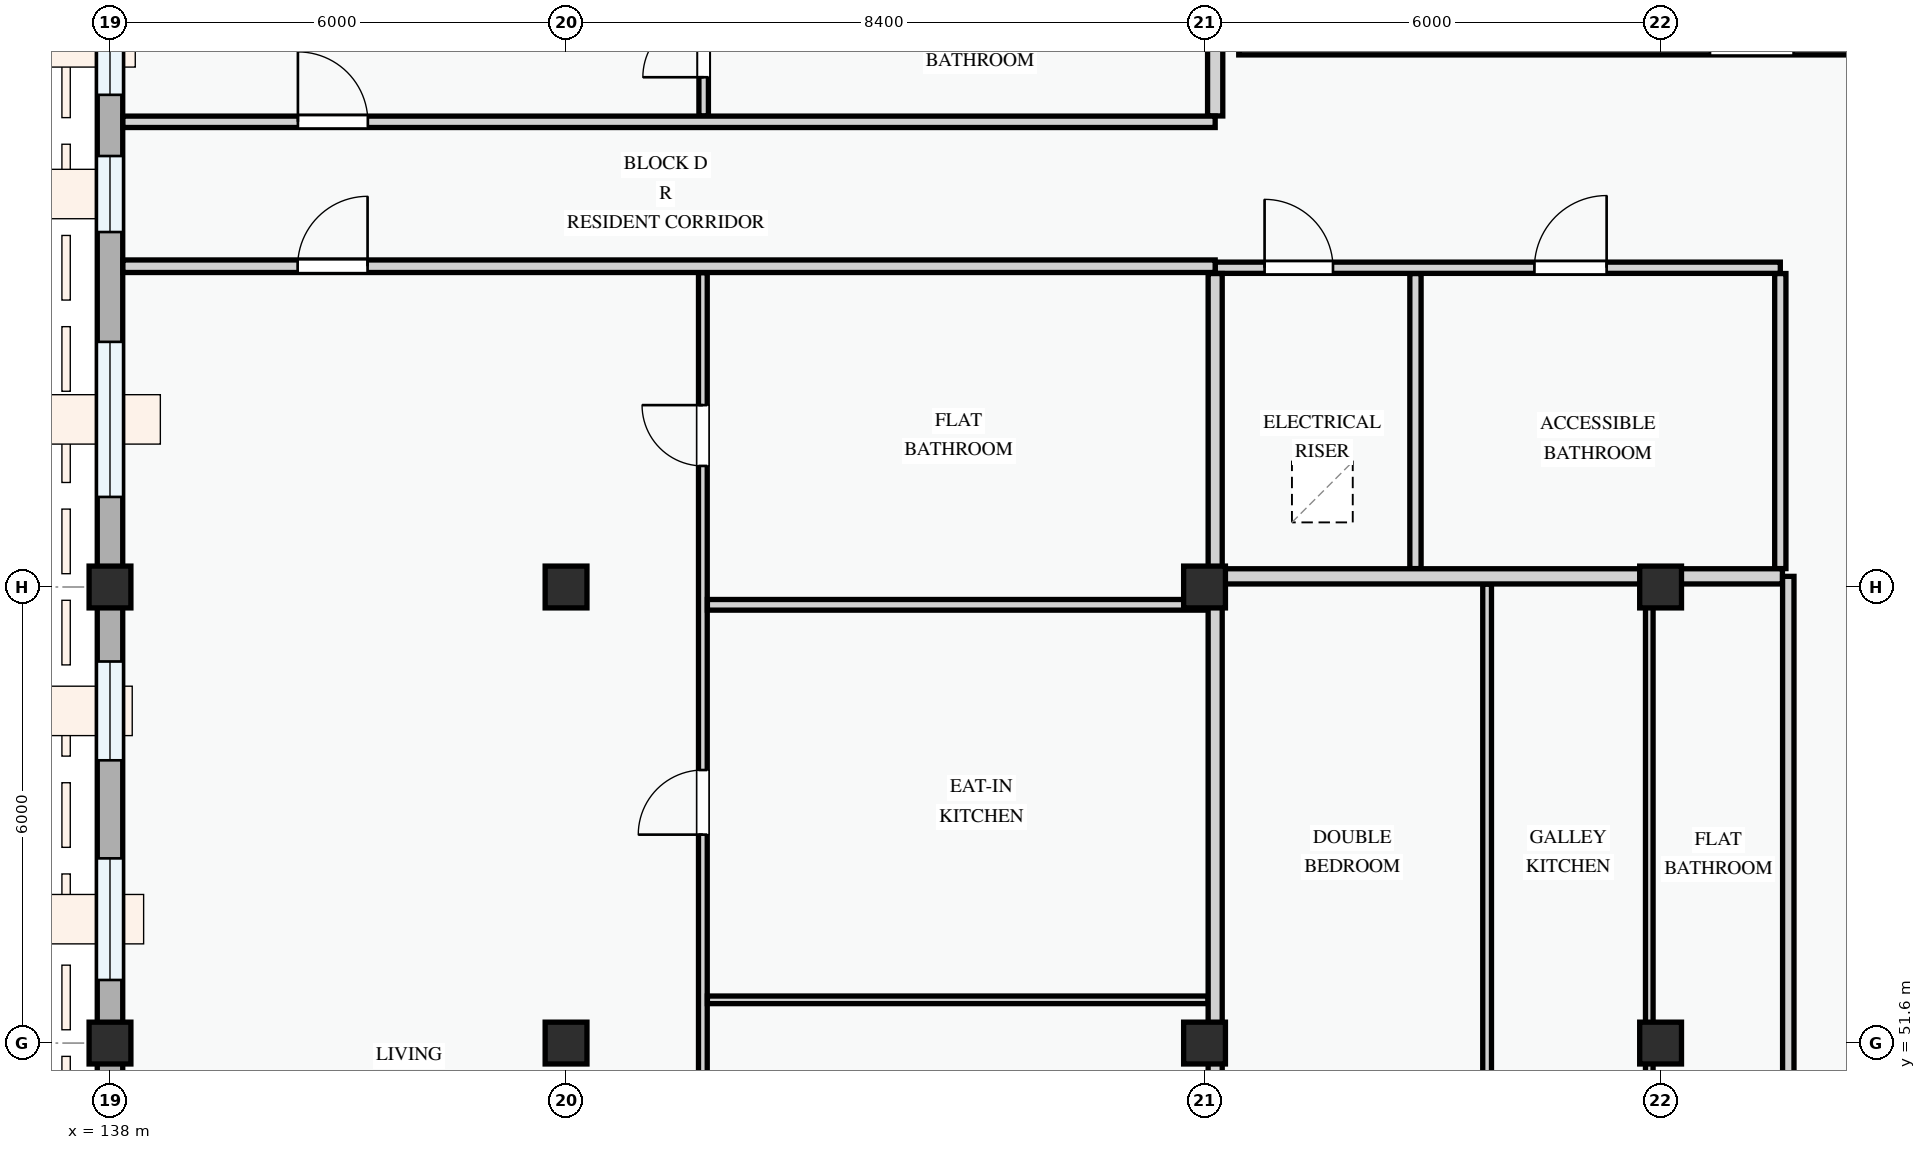
"""IFC4 building model, lengths in metres.
Left out: names, types, materials, properties, quantities, classifications, styles, units other than length and angle.
Written with IfcOpenShell. Run it as: python <this file> out.ifc"""

import sys

from ifc_helpers import new_model, si_unit, direction, frame, frame_2d, origin, origin_2d, place, context, subcontext, project, spatial, rectangle, extrude, element, fill, save


model = new_model("IFC4")
c1 = context("Model", 3, precision=1e-05, world=origin(), true_north=direction((0.0, 1.0)))
c2 = subcontext(c1, "Body", "Model", "MODEL_VIEW")
j1 = project(units=[si_unit("LENGTHUNIT", "METRE"), si_unit("PLANEANGLEUNIT", "RADIAN")], contexts=[c1])
p1 = place(None, origin())
s1 = spatial("IfcSite", under=j1, at=p1, CompositionType="ELEMENT")
p2 = place(p1, origin())
s2 = spatial("IfcBuilding", under=s1, at=p2, CompositionType="ELEMENT")
p3 = place(p2, frame((0.0, 0.0, 8.1)))
s3 = spatial("IfcBuildingStorey", under=s2, at=p3, CompositionType="ELEMENT", Elevation=8.1)
for number, where, z_axis, x_axis in (
    (1, (138.0, 51.6, 0.0), (0.0, 0.0, 1.0), (1.0, 0.0, 0.0)),
    (2, (138.0, 57.6, 0.0), (0.0, 0.0, 1.0), (1.0, 0.0, 0.0)),
    (3, (144.0, 51.6, 0.0), (0.0, 0.0, 1.0), (1.0, 0.0, 0.0)),
    (4, (144.0, 57.6, 0.0), (0.0, 0.0, 1.0), (1.0, 0.0, 0.0)),
    (5, (152.4, 51.6, 0.0), (0.0, 0.0, 1.0), (1.0, 0.0, 0.0)),
    (6, (152.4, 57.6, 0.0), (0.0, 0.0, 1.0), (1.0, 0.0, 0.0)),
    (7, (158.4, 51.6, 0.0), (0.0, 0.0, 1.0), (1.0, 0.0, 0.0)),
    (8, (158.4, 57.6, 0.0), (0.0, 0.0, 1.0), (1.0, 0.0, 0.0)),
):
    element("IfcColumn", number, at=place(p3, frame(where, z_axis=z_axis, x_axis=x_axis)), inside=s3, PredefinedType="COLUMN", context=c2, shape_type="SweptSolid", body=[
        extrude(rectangle(XDim=0.55, YDim=0.55, at=origin_2d()), origin(), (0.0, 0.0, 1.0), 3.3),
    ])
p4 = place(p3, frame((138.0, 66.0, 0.0), z_axis=(0.0, 0.0, 1.0), x_axis=(0.0, -1.0, 0.0)))
e9 = element("IfcWall", 9, at=p4, inside=s3, PredefinedType="STANDARD", context=c2, shape_type="SweptSolid", body=[
    extrude(rectangle(XDim=8.4, YDim=0.335, at=frame_2d((4.2, 0.0))), origin(), (0.0, 0.0, 1.0), 2.425),
])
p5 = place(p4, frame((0.545, 0.0, 0.78)))
e10 = element("IfcOpeningElement", 10, at=p5, cuts=e9, PredefinedType="OPENING", context=c2, shape_type="SweptSolid", body=[
    extrude(rectangle(XDim=1.38, YDim=1.48, at=frame_2d((0.69, 0.74))), frame((0.0, 0.177, 0.0), z_axis=(0.0, -1.0, 0.0), x_axis=(1.0, 0.0, 0.0)), (0.0, 0.0, 1.0), 0.355),
])
p6 = place(p4, frame((2.73, 0.0, 0.78)))
e11 = element("IfcOpeningElement", 11, at=p6, cuts=e9, PredefinedType="OPENING", context=c2, shape_type="SweptSolid", body=[
    extrude(rectangle(XDim=1.0, YDim=1.25, at=frame_2d((0.5, 0.625))), frame((0.0, 0.177, 0.0), z_axis=(0.0, -1.0, 0.0), x_axis=(1.0, 0.0, 0.0)), (0.0, 0.0, 1.0), 0.355),
])
p7 = place(p4, frame((5.175, 0.0, 0.78)))
e12 = element("IfcOpeningElement", 12, at=p7, cuts=e9, PredefinedType="OPENING", context=c2, shape_type="SweptSolid", body=[
    extrude(rectangle(XDim=2.04, YDim=1.46, at=frame_2d((1.02, 0.73))), frame((0.0, 0.177, 0.0), z_axis=(0.0, -1.0, 0.0), x_axis=(1.0, 0.0, 0.0)), (0.0, 0.0, 1.0), 0.355),
])
p8 = place(p3, frame((138.0, 57.6, 0.0), z_axis=(0.0, 0.0, 1.0), x_axis=(0.0, -1.0, 0.0)))
e13 = element("IfcWall", 13, at=p8, inside=s3, PredefinedType="STANDARD", context=c2, shape_type="SweptSolid", body=[
    extrude(rectangle(XDim=6.0, YDim=0.335, at=frame_2d((3.0, 0.0))), origin(), (0.0, 0.0, 1.0), 2.575),
])
p9 = place(p8, frame((0.98, 0.0, 0.78)))
e14 = element("IfcOpeningElement", 14, at=p9, cuts=e13, PredefinedType="OPENING", context=c2, shape_type="SweptSolid", body=[
    extrude(rectangle(XDim=1.3, YDim=1.4, at=frame_2d((0.65, 0.7))), frame((0.0, 0.177, 0.0), z_axis=(0.0, -1.0, 0.0), x_axis=(1.0, 0.0, 0.0)), (0.0, 0.0, 1.0), 0.355),
])
p10 = place(p8, frame((3.57, 0.0, 0.78)))
e15 = element("IfcOpeningElement", 15, at=p10, cuts=e13, PredefinedType="OPENING", context=c2, shape_type="SweptSolid", body=[
    extrude(rectangle(XDim=1.6, YDim=1.55, at=frame_2d((0.8, 0.775))), frame((0.0, 0.177, 0.0), z_axis=(0.0, -1.0, 0.0), x_axis=(1.0, 0.0, 0.0)), (0.0, 0.0, 1.0), 0.355),
])
p11 = place(p3, frame((138.0, 51.6, 0.0), z_axis=(0.0, 0.0, 1.0), x_axis=(0.0, -1.0, 0.0)))
e16 = element("IfcWall", 16, at=p11, inside=s3, PredefinedType="STANDARD", context=c2, shape_type="SweptSolid", body=[
    extrude(rectangle(XDim=8.4, YDim=0.335, at=frame_2d((4.2, 0.0))), origin(), (0.0, 0.0, 1.0), 2.425),
])
p12 = place(p11, frame((1.42, 0.0, 0.78)))
e17 = element("IfcOpeningElement", 17, at=p12, cuts=e16, PredefinedType="OPENING", context=c2, shape_type="SweptSolid", body=[
    extrude(rectangle(XDim=1.62, YDim=1.38, at=frame_2d((0.81, 0.69))), frame((0.0, 0.177, 0.0), z_axis=(0.0, -1.0, 0.0), x_axis=(1.0, 0.0, 0.0)), (0.0, 0.0, 1.0), 0.355),
])
p13 = place(p11, frame((5.18, 0.0, 0.78)))
e18 = element("IfcOpeningElement", 18, at=p13, cuts=e16, PredefinedType="OPENING", context=c2, shape_type="SweptSolid", body=[
    extrude(rectangle(XDim=1.98, YDim=1.5, at=frame_2d((0.99, 0.75))), frame((0.0, 0.177, 0.0), z_axis=(0.0, -1.0, 0.0), x_axis=(1.0, 0.0, 0.0)), (0.0, 0.0, 1.0), 0.355),
])
p14 = place(p3, frame((152.85, 64.725, 0.0), z_axis=(0.0, 0.0, 1.0), x_axis=(1.0, 0.0, 0.0)))
e19 = element("IfcWall", 19, at=p14, inside=s3, PredefinedType="SHEAR", context=c2, shape_type="SweptSolid", body=[
    extrude(rectangle(XDim=13.5, YDim=0.25, at=frame_2d((6.75, 0.0))), origin(), (0.0, 0.0, 1.0), 3.0),
])
p15 = place(p14, frame((6.2, 0.0, 0.0)))
e20 = element("IfcOpeningElement", 20, at=p15, cuts=e19, PredefinedType="OPENING", context=c2, shape_type="SweptSolid", body=[
    extrude(rectangle(XDim=1.1, YDim=2.15, at=frame_2d((0.55, 1.075))), frame((0.0, 0.135, 0.0), z_axis=(0.0, -1.0, 0.0), x_axis=(1.0, 0.0, 0.0)), (0.0, 0.0, 1.0), 0.27),
])
for number, where, z_axis, x_axis in (
    (21, (155.175, 61.724, 0.0), (0.0, 0.0, 1.0), (0.0, -1.0, 0.0)),
    (22, (159.975, 61.724, 0.0), (0.0, 0.0, 1.0), (0.0, -1.0, 0.0)),
):
    element("IfcWall", number, at=place(p3, frame(where, z_axis=z_axis, x_axis=x_axis)), inside=s3, PredefinedType="PARTITIONING", context=c2, shape_type="SweptSolid", body=[
        extrude(rectangle(XDim=3.882, YDim=0.148, at=frame_2d((1.941, 0.0))), origin(), (0.0, 0.0, 1.0), 3.0),
    ])
p16 = place(p3, frame((152.54, 61.8, 0.0), z_axis=(0.0, 0.0, 1.0), x_axis=(1.0, 0.0, 0.0)))
e23 = element("IfcWall", 23, at=p16, inside=s3, PredefinedType="PARTITIONING", context=c2, shape_type="SweptSolid", body=[
    extrude(rectangle(XDim=7.435, YDim=0.148, at=frame_2d((3.718, 0.0))), origin(), (0.0, 0.0, 1.0), 3.0),
])
p17 = place(p16, frame((0.65, 0.0, 0.0)))
e24 = element("IfcOpeningElement", 24, at=p17, cuts=e23, PredefinedType="OPENING", context=c2, shape_type="SweptSolid", body=[
    extrude(rectangle(XDim=0.9, YDim=2.1, at=frame_2d((0.45, 1.05))), frame((0.0, 0.084, 0.0), z_axis=(0.0, -1.0, 0.0), x_axis=(1.0, 0.0, 0.0)), (0.0, 0.0, 1.0), 0.168),
])
p18 = place(p16, frame((4.2, 0.0, 0.0)))
e25 = element("IfcOpeningElement", 25, at=p18, cuts=e23, PredefinedType="OPENING", context=c2, shape_type="SweptSolid", body=[
    extrude(rectangle(XDim=0.95, YDim=2.1, at=frame_2d((0.475, 1.05))), frame((0.0, 0.084, 0.0), z_axis=(0.0, -1.0, 0.0), x_axis=(1.0, 0.0, 0.0)), (0.0, 0.0, 1.0), 0.168),
])
p19 = place(p3, frame((156.118, 49.945, 0.0), z_axis=(0.0, 0.0, 1.0), x_axis=(0.0, 1.0, 0.0)))
e26 = element("IfcWall", 26, at=p19, inside=s3, PredefinedType="PARTITIONING", context=c2, shape_type="SweptSolid", body=[
    extrude(rectangle(XDim=7.693, YDim=0.115, at=frame_2d((3.847, 0.0))), origin(), (0.0, 0.0, 1.0), 3.0),
])
p20 = place(p3, frame((158.251, 49.945, 0.0), z_axis=(0.0, 0.0, 1.0), x_axis=(0.0, 1.0, 0.0)))
e27 = element("IfcWall", 27, at=p20, inside=s3, PredefinedType="PARTITIONING", context=c2, shape_type="SweptSolid", body=[
    extrude(rectangle(XDim=7.693, YDim=0.1, at=frame_2d((3.847, 0.0))), origin(), (0.0, 0.0, 1.0), 2.425),
])
p21 = place(p3, frame((152.635, 57.74, 0.0), z_axis=(0.0, 0.0, 1.0), x_axis=(1.0, 0.0, 0.0)))
e28 = element("IfcWall", 28, at=p21, inside=s3, PredefinedType="PARTITIONING", context=c2, shape_type="SweptSolid", body=[
    extrude(rectangle(XDim=7.368, YDim=0.2, at=frame_2d((3.684, 0.0))), origin(), (0.0, 0.0, 1.0), 2.375),
])
p22 = place(p3, frame((160.08, 37.369, 0.0), z_axis=(0.0, 0.0, 1.0), x_axis=(0.0, 1.0, 0.0)))
e29 = element("IfcWall", 29, at=p22, inside=s3, PredefinedType="PARTITIONING", context=c2, shape_type="SweptSolid", body=[
    extrude(rectangle(XDim=20.371, YDim=0.15, at=frame_2d((10.185, 0.0))), origin(), (0.0, 0.0, 1.0), 3.0),
])
p23 = place(p22, frame((2.333, 0.0, 0.0)))
e30 = element("IfcOpeningElement", 30, at=p23, cuts=e29, PredefinedType="OPENING", context=c2, shape_type="SweptSolid", body=[
    extrude(rectangle(XDim=0.92, YDim=2.1, at=frame_2d((0.46, 1.05))), frame((0.0, 0.085, 0.0), z_axis=(0.0, -1.0, 0.0), x_axis=(1.0, 0.0, 0.0)), (0.0, 0.0, 1.0), 0.17),
])
p24 = place(p22, frame((9.601, 0.0, 0.0)))
e31 = element("IfcOpeningElement", 31, at=p24, cuts=e29, PredefinedType="OPENING", context=c2, shape_type="SweptSolid", body=[
    extrude(rectangle(XDim=0.92, YDim=2.1, at=frame_2d((0.46, 1.05))), frame((0.0, 0.085, 0.0), z_axis=(0.0, -1.0, 0.0), x_axis=(1.0, 0.0, 0.0)), (0.0, 0.0, 1.0), 0.17),
])
p25 = place(p3, frame((145.8, 43.369, 0.0), z_axis=(0.0, 0.0, 1.0), x_axis=(0.0, 1.0, 0.0)))
e32 = element("IfcWall", 32, at=p25, inside=s3, PredefinedType="PARTITIONING", context=c2, shape_type="SweptSolid", body=[
    extrude(rectangle(XDim=18.366, YDim=0.115, at=frame_2d((9.183, 0.0))), origin(), (0.0, 0.0, 1.0), 3.0),
])
p26 = place(p25, frame((3.92, 0.0, 0.0)))
e33 = element("IfcOpeningElement", 33, at=p26, cuts=e32, PredefinedType="OPENING", context=c2, shape_type="SweptSolid", body=[
    extrude(rectangle(XDim=0.85, YDim=2.1, at=frame_2d((0.425, 1.05))), frame((0.0, 0.067, 0.0), z_axis=(0.0, -1.0, 0.0), x_axis=(1.0, 0.0, 0.0)), (0.0, 0.0, 1.0), 0.135),
])
p27 = place(p25, frame((10.973, 0.0, 0.0)))
e34 = element("IfcOpeningElement", 34, at=p27, cuts=e32, PredefinedType="OPENING", context=c2, shape_type="SweptSolid", body=[
    extrude(rectangle(XDim=0.85, YDim=2.1, at=frame_2d((0.425, 1.05))), frame((0.0, 0.067, 0.0), z_axis=(0.0, -1.0, 0.0), x_axis=(1.0, 0.0, 0.0)), (0.0, 0.0, 1.0), 0.135),
])
p28 = place(p25, frame((15.823, 0.0, 0.0)))
e35 = element("IfcOpeningElement", 35, at=p28, cuts=e32, PredefinedType="OPENING", context=c2, shape_type="SweptSolid", body=[
    extrude(rectangle(XDim=0.8, YDim=2.1, at=frame_2d((0.4, 1.05))), frame((0.0, 0.067, 0.0), z_axis=(0.0, -1.0, 0.0), x_axis=(1.0, 0.0, 0.0)), (0.0, 0.0, 1.0), 0.135),
])
p29 = place(p3, frame((145.86, 52.169, 0.0), z_axis=(0.0, 0.0, 1.0), x_axis=(1.0, 0.0, 0.0)))
e36 = element("IfcWall", 36, at=p29, inside=s3, PredefinedType="PARTITIONING", context=c2, shape_type="SweptSolid", body=[
    extrude(rectangle(XDim=6.586, YDim=0.1, at=frame_2d((3.293, 0.0))), origin(), (0.0, 0.0, 1.0), 3.0),
])
p30 = place(p3, frame((145.86, 57.365, 0.0), z_axis=(0.0, 0.0, 1.0), x_axis=(1.0, 0.0, 0.0)))
e37 = element("IfcWall", 37, at=p30, inside=s3, PredefinedType="PARTITIONING", context=c2, shape_type="SweptSolid", body=[
    extrude(rectangle(XDim=6.586, YDim=0.14, at=frame_2d((3.293, 0.0))), origin(), (0.0, 0.0, 1.0), 2.375),
])
p31 = place(p3, frame((145.81, 63.797, 0.0), z_axis=(0.0, 0.0, 1.0), x_axis=(0.0, 1.0, 0.0)))
e38 = element("IfcWall", 38, at=p31, inside=s3, PredefinedType="PARTITIONING", context=c2, shape_type="SweptSolid", body=[
    extrude(rectangle(XDim=8.033, YDim=0.125, at=frame_2d((4.017, 0.0))), origin(), (0.0, 0.0, 1.0), 3.0),
])
p32 = place(p31, frame((0.51, 0.0, 0.0)))
e39 = element("IfcOpeningElement", 39, at=p32, cuts=e38, PredefinedType="OPENING", context=c2, shape_type="SweptSolid", body=[
    extrude(rectangle(XDim=0.8, YDim=2.1, at=frame_2d((0.4, 1.05))), frame((0.0, 0.073, 0.0), z_axis=(0.0, -1.0, 0.0), x_axis=(1.0, 0.0, 0.0)), (0.0, 0.0, 1.0), 0.145),
])
p33 = place(p31, frame((2.622, 0.0, 0.0)))
e40 = element("IfcOpeningElement", 40, at=p33, cuts=e38, PredefinedType="OPENING", context=c2, shape_type="SweptSolid", body=[
    extrude(rectangle(XDim=0.85, YDim=2.1, at=frame_2d((0.425, 1.05))), frame((0.0, 0.073, 0.0), z_axis=(0.0, -1.0, 0.0), x_axis=(1.0, 0.0, 0.0)), (0.0, 0.0, 1.0), 0.145),
])
p34 = place(p31, frame((5.745, 0.0, 0.0)))
e41 = element("IfcOpeningElement", 41, at=p34, cuts=e38, PredefinedType="OPENING", context=c2, shape_type="SweptSolid", body=[
    extrude(rectangle(XDim=0.85, YDim=2.1, at=frame_2d((0.425, 1.05))), frame((0.0, 0.073, 0.0), z_axis=(0.0, -1.0, 0.0), x_axis=(1.0, 0.0, 0.0)), (0.0, 0.0, 1.0), 0.145),
])
p35 = place(p3, frame((152.54, 43.26, 0.0), z_axis=(0.0, 0.0, 1.0), x_axis=(0.0, 1.0, 0.0)))
e42 = element("IfcWall", 42, at=p35, inside=s3, PredefinedType="PARTITIONING", context=c2, shape_type="SweptSolid", body=[
    extrude(rectangle(XDim=18.464, YDim=0.185, at=frame_2d((9.232, 0.0))), origin(), (0.0, 0.0, 1.0), 2.425),
])
p36 = place(p3, frame((152.54, 63.797, 0.0), z_axis=(0.0, 0.0, 1.0), x_axis=(0.0, 1.0, 0.0)))
e43 = element("IfcWall", 43, at=p36, inside=s3, PredefinedType="PARTITIONING", context=c2, shape_type="SweptSolid", body=[
    extrude(rectangle(XDim=8.033, YDim=0.2, at=frame_2d((4.017, 0.0))), origin(), (0.0, 0.0, 1.0), 2.425),
])
p37 = place(p3, frame((138.169, 61.82, 0.0), z_axis=(0.0, 0.0, 1.0), x_axis=(1.0, 0.0, 0.0)))
e44 = element("IfcWall", 44, at=p37, inside=s3, PredefinedType="PARTITIONING", context=c2, shape_type="SweptSolid", body=[
    extrude(rectangle(XDim=14.371, YDim=0.165, at=frame_2d((7.185, 0.0))), origin(), (0.0, 0.0, 1.0), 3.0),
])
p38 = place(p37, frame((2.299, 0.0, 0.0)))
e45 = element("IfcOpeningElement", 45, at=p38, cuts=e44, PredefinedType="OPENING", context=c2, shape_type="SweptSolid", body=[
    extrude(rectangle(XDim=0.92, YDim=2.1, at=frame_2d((0.46, 1.05))), frame((0.0, 0.093, 0.0), z_axis=(0.0, -1.0, 0.0), x_axis=(1.0, 0.0, 0.0)), (0.0, 0.0, 1.0), 0.185),
])
p39 = place(p3, frame((138.169, 63.72, 0.0), z_axis=(0.0, 0.0, 1.0), x_axis=(1.0, 0.0, 0.0)))
e46 = element("IfcWall", 46, at=p39, inside=s3, PredefinedType="PARTITIONING", context=c2, shape_type="SweptSolid", body=[
    extrude(rectangle(XDim=14.371, YDim=0.15, at=frame_2d((7.185, 0.0))), origin(), (0.0, 0.0, 1.0), 3.0),
])
p40 = place(p39, frame((2.303, 0.0, 0.0)))
e47 = element("IfcOpeningElement", 47, at=p40, cuts=e46, PredefinedType="OPENING", context=c2, shape_type="SweptSolid", body=[
    extrude(rectangle(XDim=0.92, YDim=2.1, at=frame_2d((0.46, 1.05))), frame((0.0, 0.085, 0.0), z_axis=(0.0, -1.0, 0.0), x_axis=(1.0, 0.0, 0.0)), (0.0, 0.0, 1.0), 0.17),
])
p41 = place(p5, origin())
e48 = element("IfcWindow", 48, at=p41, inside=s3, PartitioningType="SINGLE_PANEL", PredefinedType="WINDOW", context=c2, shape_type="SweptSolid", body=[
    extrude(rectangle(XDim=1.38, YDim=1.48, at=frame_2d((0.69, 0.74))), frame((0.0, 0.03, 0.0), z_axis=(0.0, -1.0, 0.0), x_axis=(1.0, 0.0, 0.0)), (0.0, 0.0, 1.0), 0.06),
])
fill(e10, e48)
p42 = place(p6, origin())
e49 = element("IfcWindow", 49, at=p42, inside=s3, PartitioningType="SINGLE_PANEL", PredefinedType="WINDOW", context=c2, shape_type="SweptSolid", body=[
    extrude(rectangle(XDim=1.0, YDim=1.25, at=frame_2d((0.5, 0.625))), frame((0.0, 0.03, 0.0), z_axis=(0.0, -1.0, 0.0), x_axis=(1.0, 0.0, 0.0)), (0.0, 0.0, 1.0), 0.06),
])
fill(e11, e49)
p43 = place(p7, origin())
e50 = element("IfcWindow", 50, at=p43, inside=s3, PartitioningType="DOUBLE_PANEL_VERTICAL", PredefinedType="WINDOW", context=c2, shape_type="SweptSolid", body=[
    extrude(rectangle(XDim=2.04, YDim=1.46, at=frame_2d((1.02, 0.73))), frame((0.0, 0.03, 0.0), z_axis=(0.0, -1.0, 0.0), x_axis=(1.0, 0.0, 0.0)), (0.0, 0.0, 1.0), 0.06),
])
fill(e12, e50)
p44 = place(p9, origin())
e51 = element("IfcWindow", 51, at=p44, inside=s3, PartitioningType="SINGLE_PANEL", PredefinedType="WINDOW", context=c2, shape_type="SweptSolid", body=[
    extrude(rectangle(XDim=1.3, YDim=1.4, at=frame_2d((0.65, 0.7))), frame((0.0, 0.03, 0.0), z_axis=(0.0, -1.0, 0.0), x_axis=(1.0, 0.0, 0.0)), (0.0, 0.0, 1.0), 0.06),
])
fill(e14, e51)
p45 = place(p10, origin())
e52 = element("IfcWindow", 52, at=p45, inside=s3, PartitioningType="DOUBLE_PANEL_VERTICAL", PredefinedType="WINDOW", context=c2, shape_type="SweptSolid", body=[
    extrude(rectangle(XDim=1.6, YDim=1.55, at=frame_2d((0.8, 0.775))), frame((0.0, 0.03, 0.0), z_axis=(0.0, -1.0, 0.0), x_axis=(1.0, 0.0, 0.0)), (0.0, 0.0, 1.0), 0.06),
])
fill(e15, e52)
p46 = place(p17, origin())
e53 = element("IfcDoor", 53, at=p46, inside=s3, OperationType="SINGLE_SWING_LEFT", PredefinedType="DOOR", context=c2, shape_type="SweptSolid", body=[
    extrude(rectangle(XDim=0.9, YDim=2.1, at=frame_2d((0.45, 1.05))), frame((0.0, 0.025, 0.0), z_axis=(0.0, -1.0, 0.0), x_axis=(1.0, 0.0, 0.0)), (0.0, 0.0, 1.0), 0.05),
])
fill(e24, e53)
p47 = place(p18, origin())
e54 = element("IfcDoor", 54, at=p47, inside=s3, OperationType="SINGLE_SWING_RIGHT", PredefinedType="DOOR", context=c2, shape_type="SweptSolid", body=[
    extrude(rectangle(XDim=0.95, YDim=2.1, at=frame_2d((0.475, 1.05))), frame((0.0, 0.025, 0.0), z_axis=(0.0, -1.0, 0.0), x_axis=(1.0, 0.0, 0.0)), (0.0, 0.0, 1.0), 0.05),
])
fill(e25, e54)
p48 = place(p27, origin())
e55 = element("IfcDoor", 55, at=p48, inside=s3, OperationType="SINGLE_SWING_LEFT", PredefinedType="DOOR", context=c2, shape_type="SweptSolid", body=[
    extrude(rectangle(XDim=0.85, YDim=2.1, at=frame_2d((0.425, 1.05))), frame((0.0, 0.025, 0.0), z_axis=(0.0, -1.0, 0.0), x_axis=(1.0, 0.0, 0.0)), (0.0, 0.0, 1.0), 0.05),
])
fill(e34, e55)
p49 = place(p28, origin())
e56 = element("IfcDoor", 56, at=p49, inside=s3, OperationType="SINGLE_SWING_RIGHT", PredefinedType="DOOR", context=c2, shape_type="SweptSolid", body=[
    extrude(rectangle(XDim=0.8, YDim=2.1, at=frame_2d((0.4, 1.05))), frame((0.0, 0.025, 0.0), z_axis=(0.0, -1.0, 0.0), x_axis=(1.0, 0.0, 0.0)), (0.0, 0.0, 1.0), 0.05),
])
fill(e35, e56)
p50 = place(p32, origin())
e57 = element("IfcDoor", 57, at=p50, inside=s3, OperationType="SINGLE_SWING_LEFT", PredefinedType="DOOR", context=c2, shape_type="SweptSolid", body=[
    extrude(rectangle(XDim=0.8, YDim=2.1, at=frame_2d((0.4, 1.05))), frame((0.0, 0.025, 0.0), z_axis=(0.0, -1.0, 0.0), x_axis=(1.0, 0.0, 0.0)), (0.0, 0.0, 1.0), 0.05),
])
fill(e39, e57)
p51 = place(p38, origin())
e58 = element("IfcDoor", 58, at=p51, inside=s3, OperationType="SINGLE_SWING_RIGHT", PredefinedType="DOOR", context=c2, shape_type="SweptSolid", body=[
    extrude(rectangle(XDim=0.92, YDim=2.1, at=frame_2d((0.46, 1.05))), frame((0.0, 0.025, 0.0), z_axis=(0.0, -1.0, 0.0), x_axis=(1.0, 0.0, 0.0)), (0.0, 0.0, 1.0), 0.05),
])
fill(e45, e58)
p52 = place(p40, origin())
e59 = element("IfcDoor", 59, at=p52, inside=s3, OperationType="SINGLE_SWING_LEFT", PredefinedType="DOOR", context=c2, shape_type="SweptSolid", body=[
    extrude(rectangle(XDim=0.92, YDim=2.1, at=frame_2d((0.46, 1.05))), frame((0.0, 0.025, 0.0), z_axis=(0.0, -1.0, 0.0), x_axis=(1.0, 0.0, 0.0)), (0.0, 0.0, 1.0), 0.05),
])
fill(e47, e59)
save(model, sys.argv[1])
